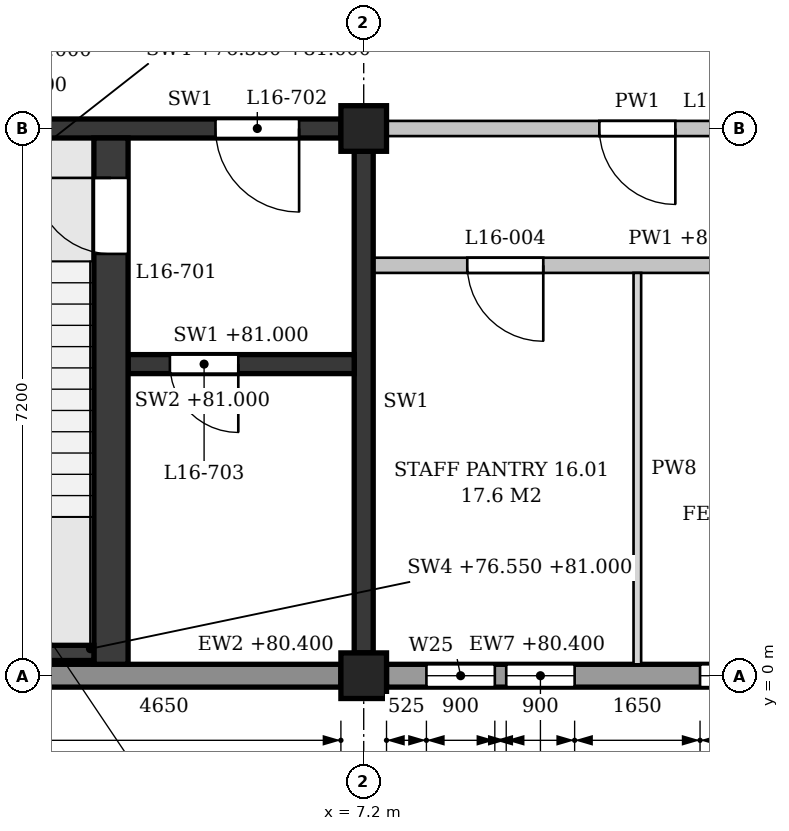
"""IFC4 building model, lengths in metres.
Left out: names, types, materials, properties, quantities, classifications, styles, units other than length and angle.
Written with IfcOpenShell. Run it as: python <this file> out.ifc"""

import sys

from ifc_helpers import new_model, si_unit, direction, frame, frame_2d, origin, origin_2d, place, context, subcontext, project, spatial, polyline, rectangle, outline, extrude, element, fill, save


model = new_model("IFC4")
c1 = context("Model", 3, precision=1e-05, world=origin(), true_north=direction((0.0, 1.0)))
c2 = subcontext(c1, "Body", "Model", "MODEL_VIEW")
j1 = project(units=[si_unit("LENGTHUNIT", "METRE"), si_unit("PLANEANGLEUNIT", "RADIAN")], contexts=[c1])
p1 = place(None, origin())
s1 = spatial("IfcSite", under=j1, at=p1, CompositionType="ELEMENT")
p2 = place(p1, origin())
s2 = spatial("IfcBuilding", under=s1, at=p2, CompositionType="ELEMENT")
p3 = place(p2, frame((0.0, 0.0, 76.8)))
s3 = spatial("IfcBuildingStorey", under=s2, at=p3, CompositionType="ELEMENT", Elevation=76.8)
for number, where, z_axis, x_axis in (
    (1, (7.2, 0.0, 0.0), (0.0, 0.0, 1.0), (1.0, 0.0, 0.0)),
    (2, (7.2, 7.2, 0.0), (0.0, 0.0, 1.0), (1.0, 0.0, 0.0)),
):
    element("IfcColumn", number, at=place(p3, frame(where, z_axis=z_axis, x_axis=x_axis)), inside=s3, PredefinedType="COLUMN", context=c2, shape_type="SweptSolid", body=[
        extrude(rectangle(XDim=0.6, YDim=0.6, at=origin_2d()), origin(), (0.0, 0.0, 1.0), 4.5),
    ])
p4 = place(p3, frame((0.3, 0.0, 0.0), z_axis=(0.0, 0.0, 1.0), x_axis=(1.0, 0.0, 0.0)))
e3 = element("IfcWall", 3, at=p4, inside=s3, PredefinedType="STANDARD", context=c2, shape_type="SweptSolid", body=[
    extrude(rectangle(XDim=6.6, YDim=0.3, at=frame_2d((3.3, 0.0))), origin(), (0.0, 0.0, 1.0), 3.6),
])
p5 = place(p4, frame((1.05, 0.0, 0.9)))
e4 = element("IfcOpeningElement", 4, at=p5, cuts=e3, PredefinedType="OPENING", context=c2, shape_type="SweptSolid", body=[
    extrude(outline(polyline([(0.0, 0.0), (0.9, 0.0), (0.9, 2.15), (0.45, 2.6), (0.0, 2.15), (0.0, 0.0)])), frame((0.0, 0.16, 0.0), z_axis=(0.0, -1.0, 0.0), x_axis=(1.0, 0.0, 0.0)), (0.0, 0.0, 1.0), 0.32),
])
p6 = place(p3, frame((7.5, 0.0, 0.0), z_axis=(0.0, 0.0, 1.0), x_axis=(1.0, 0.0, 0.0)))
e5 = element("IfcWall", 5, at=p6, inside=s3, PredefinedType="STANDARD", context=c2, shape_type="SweptSolid", body=[
    extrude(rectangle(XDim=6.6, YDim=0.3, at=frame_2d((3.3, 0.0))), origin(), (0.0, 0.0, 1.0), 3.6),
])
p7 = place(p6, frame((0.525, 0.0, 0.9)))
e6 = element("IfcOpeningElement", 6, at=p7, cuts=e5, PredefinedType="OPENING", context=c2, shape_type="SweptSolid", body=[
    extrude(outline(polyline([(0.0, 0.0), (0.9, 0.0), (0.9, 2.15), (0.45, 2.6), (0.0, 2.15), (0.0, 0.0)])), frame((0.0, 0.16, 0.0), z_axis=(0.0, -1.0, 0.0), x_axis=(1.0, 0.0, 0.0)), (0.0, 0.0, 1.0), 0.32),
])
p8 = place(p6, frame((1.575, 0.0, 0.9)))
e7 = element("IfcOpeningElement", 7, at=p8, cuts=e5, PredefinedType="OPENING", context=c2, shape_type="SweptSolid", body=[
    extrude(outline(polyline([(0.0, 0.0), (0.9, 0.0), (0.9, 2.15), (0.45, 2.6), (0.0, 2.15), (0.0, 0.0)])), frame((0.0, 0.16, 0.0), z_axis=(0.0, -1.0, 0.0), x_axis=(1.0, 0.0, 0.0)), (0.0, 0.0, 1.0), 0.32),
])
p9 = place(p6, frame((4.125, 0.0, 0.9)))
e8 = element("IfcOpeningElement", 8, at=p9, cuts=e5, PredefinedType="OPENING", context=c2, shape_type="SweptSolid", body=[
    extrude(outline(polyline([(0.0, 0.0), (0.9, 0.0), (0.9, 2.15), (0.45, 2.6), (0.0, 2.15), (0.0, 0.0)])), frame((0.0, 0.16, 0.0), z_axis=(0.0, -1.0, 0.0), x_axis=(1.0, 0.0, 0.0)), (0.0, 0.0, 1.0), 0.32),
])
p10 = place(p6, frame((5.175, 0.0, 0.9)))
e9 = element("IfcOpeningElement", 9, at=p10, cuts=e5, PredefinedType="OPENING", context=c2, shape_type="SweptSolid", body=[
    extrude(outline(polyline([(0.0, 0.0), (0.9, 0.0), (0.9, 2.15), (0.45, 2.6), (0.0, 2.15), (0.0, 0.0)])), frame((0.0, 0.16, 0.0), z_axis=(0.0, -1.0, 0.0), x_axis=(1.0, 0.0, 0.0)), (0.0, 0.0, 1.0), 0.32),
])
p11 = place(p3, frame((0.3, 7.2, 0.0), z_axis=(0.0, 0.0, 1.0), x_axis=(1.0, 0.0, 0.0)))
e10 = element("IfcWall", 10, at=p11, inside=s3, PredefinedType="SHEAR", context=c2, shape_type="SweptSolid", body=[
    extrude(rectangle(XDim=6.6, YDim=0.25, at=frame_2d((3.3, 0.0))), origin(), (0.0, 0.0, 1.0), 3.55),
])
p12 = place(p11, frame((4.95, 0.0, 0.0)))
e11 = element("IfcOpeningElement", 11, at=p12, cuts=e10, PredefinedType="OPENING", context=c2, shape_type="SweptSolid", body=[
    extrude(rectangle(XDim=1.1, YDim=2.1, at=frame_2d((0.55, 1.05))), frame((0.0, 0.135, 0.0), z_axis=(0.0, -1.0, 0.0), x_axis=(1.0, 0.0, 0.0)), (0.0, 0.0, 1.0), 0.27),
])
p13 = place(p3, frame((7.2, 0.3, 0.0), z_axis=(0.0, 0.0, 1.0), x_axis=(0.0, 1.0, 0.0)))
e12 = element("IfcWall", 12, at=p13, inside=s3, PredefinedType="SHEAR", context=c2, shape_type="SweptSolid", body=[
    extrude(rectangle(XDim=6.6, YDim=0.25, at=frame_2d((3.3, 0.0))), origin(), (0.0, 0.0, 1.0), 3.55),
])
p14 = place(p3, frame((2.25, 0.3, -0.25), z_axis=(0.0, 0.0, 1.0), x_axis=(1.0, 0.0, 0.0)))
e13 = element("IfcWall", 13, at=p14, inside=s3, PredefinedType="SHEAR", context=c2, shape_type="SweptSolid", body=[
    extrude(rectangle(XDim=1.4, YDim=0.2, at=frame_2d((0.7, 0.0))), origin(), (0.0, 0.0, 1.0), 4.45),
])
p15 = place(p3, frame((3.875, 0.15, 0.0), z_axis=(0.0, 0.0, 1.0), x_axis=(0.0, 1.0, 0.0)))
e14 = element("IfcWall", 14, at=p15, inside=s3, PredefinedType="SHEAR", context=c2, shape_type="SweptSolid", body=[
    extrude(rectangle(XDim=6.925, YDim=0.45, at=frame_2d((3.462, 0.0))), origin(), (0.0, 0.0, 1.0), 4.2),
])
p16 = place(p15, frame((5.4, 0.0, 0.0)))
e15 = element("IfcOpeningElement", 15, at=p16, cuts=e14, PredefinedType="OPENING", context=c2, shape_type="SweptSolid", body=[
    extrude(rectangle(XDim=1.0, YDim=2.1, at=frame_2d((0.5, 1.05))), frame((0.0, 0.235, 0.0), z_axis=(0.0, -1.0, 0.0), x_axis=(1.0, 0.0, 0.0)), (0.0, 0.0, 1.0), 0.47),
])
p17 = place(p3, frame((4.1, 4.1, 0.0), z_axis=(0.0, 0.0, 1.0), x_axis=(1.0, 0.0, 0.0)))
e16 = element("IfcWall", 16, at=p17, inside=s3, PredefinedType="SHEAR", context=c2, shape_type="SweptSolid", body=[
    extrude(rectangle(XDim=2.975, YDim=0.25, at=frame_2d((1.487, 0.0))), origin(), (0.0, 0.0, 1.0), 4.2),
])
p18 = place(p17, frame((0.55, 0.0, 0.0)))
e17 = element("IfcOpeningElement", 17, at=p18, cuts=e16, PredefinedType="OPENING", context=c2, shape_type="SweptSolid", body=[
    extrude(rectangle(XDim=0.9, YDim=2.1, at=frame_2d((0.45, 1.05))), frame((0.0, 0.135, 0.0), z_axis=(0.0, -1.0, 0.0), x_axis=(1.0, 0.0, 0.0)), (0.0, 0.0, 1.0), 0.27),
])
p19 = place(p3, frame((7.325, 5.4, 0.0), z_axis=(0.0, 0.0, 1.0), x_axis=(1.0, 0.0, 0.0)))
e18 = element("IfcWall", 18, at=p19, inside=s3, PredefinedType="PARTITIONING", context=c2, shape_type="SweptSolid", body=[
    extrude(outline(polyline([(0.0, 0.0), (14.15, 0.0), (14.15, 3.55), (14.05, 3.55), (14.05, 4.2), (7.3, 4.2), (7.3, 3.55), (6.85, 3.55), (6.85, 4.2), (0.1, 4.2), (0.1, 3.55), (0.0, 3.55), (0.0, 0.0)])), frame((0.0, 0.1, 0.0), z_axis=(0.0, -1.0, 0.0), x_axis=(1.0, 0.0, 0.0)), (0.0, 0.0, 1.0), 0.2),
])
p20 = place(p19, frame((1.238, 0.0, 0.0)))
e19 = element("IfcOpeningElement", 19, at=p20, cuts=e18, PredefinedType="OPENING", context=c2, shape_type="SweptSolid", body=[
    extrude(rectangle(XDim=1.0, YDim=2.1, at=frame_2d((0.5, 1.05))), frame((0.0, 0.11, 0.0), z_axis=(0.0, -1.0, 0.0), x_axis=(1.0, 0.0, 0.0)), (0.0, 0.0, 1.0), 0.22),
])
p21 = place(p19, frame((4.775, 0.0, 0.0)))
e20 = element("IfcOpeningElement", 20, at=p21, cuts=e18, PredefinedType="OPENING", context=c2, shape_type="SweptSolid", body=[
    extrude(rectangle(XDim=1.0, YDim=2.1, at=frame_2d((0.5, 1.05))), frame((0.0, 0.11, 0.0), z_axis=(0.0, -1.0, 0.0), x_axis=(1.0, 0.0, 0.0)), (0.0, 0.0, 1.0), 0.22),
])
p22 = place(p19, frame((8.375, 0.0, 0.0)))
e21 = element("IfcOpeningElement", 21, at=p22, cuts=e18, PredefinedType="OPENING", context=c2, shape_type="SweptSolid", body=[
    extrude(rectangle(XDim=1.0, YDim=2.1, at=frame_2d((0.5, 1.05))), frame((0.0, 0.11, 0.0), z_axis=(0.0, -1.0, 0.0), x_axis=(1.0, 0.0, 0.0)), (0.0, 0.0, 1.0), 0.22),
])
p23 = place(p19, frame((11.913, 0.0, 0.0)))
e22 = element("IfcOpeningElement", 22, at=p23, cuts=e18, PredefinedType="OPENING", context=c2, shape_type="SweptSolid", body=[
    extrude(rectangle(XDim=1.0, YDim=2.1, at=frame_2d((0.5, 1.05))), frame((0.0, 0.11, 0.0), z_axis=(0.0, -1.0, 0.0), x_axis=(1.0, 0.0, 0.0)), (0.0, 0.0, 1.0), 0.22),
])
p24 = place(p3, frame((7.5, 7.2, 0.0), z_axis=(0.0, 0.0, 1.0), x_axis=(1.0, 0.0, 0.0)))
e23 = element("IfcWall", 23, at=p24, inside=s3, PredefinedType="PARTITIONING", context=c2, shape_type="SweptSolid", body=[
    extrude(rectangle(XDim=6.6, YDim=0.2, at=frame_2d((3.3, 0.0))), origin(), (0.0, 0.0, 1.0), 3.55),
])
p25 = place(p24, frame((2.8, 0.0, 0.0)))
e24 = element("IfcOpeningElement", 24, at=p25, cuts=e23, PredefinedType="OPENING", context=c2, shape_type="SweptSolid", body=[
    extrude(rectangle(XDim=1.0, YDim=2.1, at=frame_2d((0.5, 1.05))), frame((0.0, 0.11, 0.0), z_axis=(0.0, -1.0, 0.0), x_axis=(1.0, 0.0, 0.0)), (0.0, 0.0, 1.0), 0.22),
])
p26 = place(p3, frame((10.8, 0.15, 0.0), z_axis=(0.0, 0.0, 1.0), x_axis=(0.0, 1.0, 0.0)))
e25 = element("IfcWall", 25, at=p26, inside=s3, PredefinedType="PARTITIONING", context=c2, shape_type="SweptSolid", body=[
    extrude(rectangle(XDim=5.15, YDim=0.1, at=frame_2d((2.575, 0.0))), origin(), (0.0, 0.0, 1.0), 3.55),
])
p27 = place(p7, origin())
e26 = element("IfcWindow", 26, at=p27, inside=s3, PartitioningType="SINGLE_PANEL", PredefinedType="WINDOW", context=c2, shape_type="SweptSolid", body=[
    extrude(outline(polyline([(0.0, 0.0), (0.9, 0.0), (0.9, 2.15), (0.45, 2.6), (0.0, 2.15), (0.0, 0.0)])), frame((0.0, 0.03, 0.0), z_axis=(0.0, -1.0, 0.0), x_axis=(1.0, 0.0, 0.0)), (0.0, 0.0, 1.0), 0.06),
])
fill(e6, e26)
p28 = place(p8, origin())
e27 = element("IfcWindow", 27, at=p28, inside=s3, PartitioningType="SINGLE_PANEL", PredefinedType="WINDOW", context=c2, shape_type="SweptSolid", body=[
    extrude(outline(polyline([(0.0, 0.0), (0.9, 0.0), (0.9, 2.15), (0.45, 2.6), (0.0, 2.15), (0.0, 0.0)])), frame((0.0, 0.03, 0.0), z_axis=(0.0, -1.0, 0.0), x_axis=(1.0, 0.0, 0.0)), (0.0, 0.0, 1.0), 0.06),
])
fill(e7, e27)
p29 = place(p9, origin())
e28 = element("IfcWindow", 28, at=p29, inside=s3, PartitioningType="SINGLE_PANEL", PredefinedType="WINDOW", context=c2, shape_type="SweptSolid", body=[
    extrude(outline(polyline([(0.0, 0.0), (0.9, 0.0), (0.9, 2.15), (0.45, 2.6), (0.0, 2.15), (0.0, 0.0)])), frame((0.0, 0.03, 0.0), z_axis=(0.0, -1.0, 0.0), x_axis=(1.0, 0.0, 0.0)), (0.0, 0.0, 1.0), 0.06),
])
fill(e8, e28)
p30 = place(p16, origin())
e29 = element("IfcDoor", 29, at=p30, inside=s3, OperationType="SINGLE_SWING_RIGHT", PredefinedType="DOOR", context=c2, shape_type="SweptSolid", body=[
    extrude(rectangle(XDim=1.0, YDim=2.1, at=frame_2d((0.5, 1.05))), frame((0.0, 0.025, 0.0), z_axis=(0.0, -1.0, 0.0), x_axis=(1.0, 0.0, 0.0)), (0.0, 0.0, 1.0), 0.05),
])
fill(e15, e29)
p31 = place(p12, frame((1.1, 0.0, 0.0), z_axis=(0.0, 0.0, 1.0), x_axis=(-1.0, 0.0, 0.0)))
e30 = element("IfcDoor", 30, at=p31, inside=s3, OperationType="SINGLE_SWING_LEFT", PredefinedType="DOOR", context=c2, shape_type="SweptSolid", body=[
    extrude(rectangle(XDim=1.1, YDim=2.1, at=frame_2d((0.55, 1.05))), frame((0.0, 0.025, 0.0), z_axis=(0.0, -1.0, 0.0), x_axis=(1.0, 0.0, 0.0)), (0.0, 0.0, 1.0), 0.05),
])
fill(e11, e30)
p32 = place(p18, frame((0.9, 0.0, 0.0), z_axis=(0.0, 0.0, 1.0), x_axis=(-1.0, 0.0, 0.0)))
e31 = element("IfcDoor", 31, at=p32, inside=s3, OperationType="SINGLE_SWING_LEFT", PredefinedType="DOOR", context=c2, shape_type="SweptSolid", body=[
    extrude(rectangle(XDim=0.9, YDim=2.1, at=frame_2d((0.45, 1.05))), frame((0.0, 0.025, 0.0), z_axis=(0.0, -1.0, 0.0), x_axis=(1.0, 0.0, 0.0)), (0.0, 0.0, 1.0), 0.05),
])
fill(e17, e31)
p33 = place(p25, frame((1.0, 0.0, 0.0), z_axis=(0.0, 0.0, 1.0), x_axis=(-1.0, 0.0, 0.0)))
e32 = element("IfcDoor", 32, at=p33, inside=s3, OperationType="SINGLE_SWING_LEFT", PredefinedType="DOOR", context=c2, shape_type="SweptSolid", body=[
    extrude(rectangle(XDim=1.0, YDim=2.1, at=frame_2d((0.5, 1.05))), frame((0.0, 0.025, 0.0), z_axis=(0.0, -1.0, 0.0), x_axis=(1.0, 0.0, 0.0)), (0.0, 0.0, 1.0), 0.05),
])
fill(e24, e32)
p34 = place(p20, frame((1.0, 0.0, 0.0), z_axis=(0.0, 0.0, 1.0), x_axis=(-1.0, 0.0, 0.0)))
e33 = element("IfcDoor", 33, at=p34, inside=s3, OperationType="SINGLE_SWING_LEFT", PredefinedType="DOOR", context=c2, shape_type="SweptSolid", body=[
    extrude(rectangle(XDim=1.0, YDim=2.1, at=frame_2d((0.5, 1.05))), frame((0.0, 0.025, 0.0), z_axis=(0.0, -1.0, 0.0), x_axis=(1.0, 0.0, 0.0)), (0.0, 0.0, 1.0), 0.05),
])
fill(e19, e33)
save(model, sys.argv[1])
